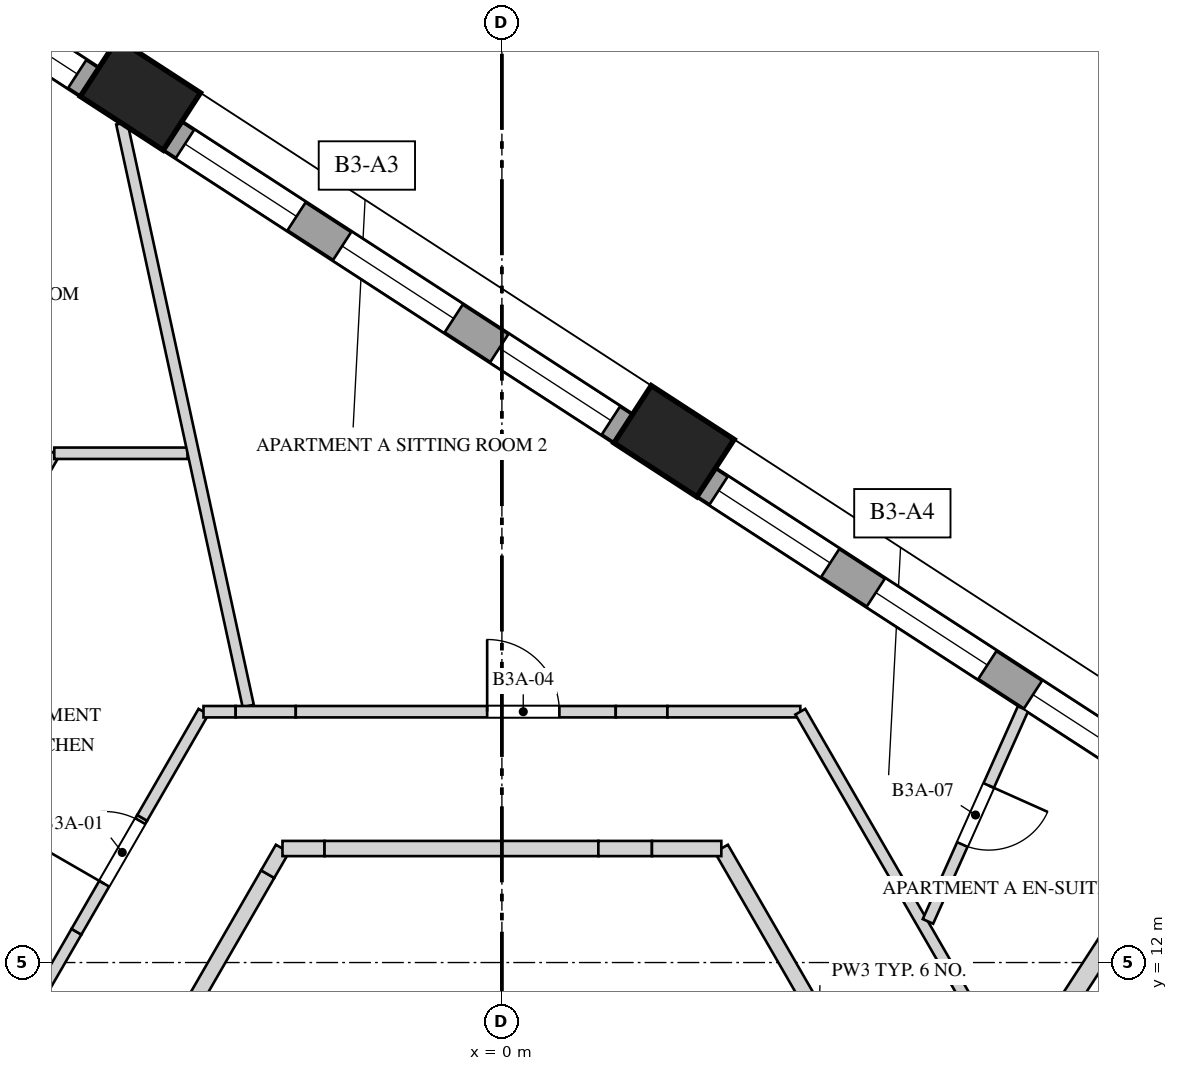
"""IFC4 building model, lengths in metres.
Left out: names, types, materials, properties, quantities, classifications, styles, units other than length and angle.
Written with IfcOpenShell. Run it as: python <this file> out.ifc"""

import sys

from ifc_helpers import new_model, si_unit, direction, frame, frame_2d, origin, origin_2d, place, context, subcontext, project, spatial, polyline, rectangle, outline, extrude, element, fill, save


model = new_model("IFC4")
c1 = context("Model", 3, precision=1e-05, world=origin(), true_north=direction((0.0, 1.0)))
c2 = subcontext(c1, "Body", "Model", "MODEL_VIEW")
j1 = project(units=[si_unit("LENGTHUNIT", "METRE"), si_unit("PLANEANGLEUNIT", "RADIAN")], contexts=[c1])
p1 = place(None, origin())
s1 = spatial("IfcSite", under=j1, at=p1, CompositionType="ELEMENT")
p2 = place(p1, origin())
s2 = spatial("IfcBuilding", under=s1, at=p2, CompositionType="ELEMENT")
p3 = place(p2, frame((0.0, 0.0, 129.6)))
s3 = spatial("IfcBuildingStorey", under=s2, at=p3, CompositionType="ELEMENT", Elevation=129.6)
for number, where, z_axis, x_axis in (
    (1, (2.265, 18.859, 0.0), (0.0, 0.0, 1.0), (-0.839, 0.545, 0.0)),
    (2, (-4.756, 23.418, 0.0), (0.0, 0.0, 1.0), (-0.839, 0.545, 0.0)),
):
    element("IfcColumn", number, at=place(p3, frame(where, z_axis=z_axis, x_axis=x_axis)), inside=s3, PredefinedType="COLUMN", context=c2, shape_type="SweptSolid", body=[
        extrude(rectangle(XDim=1.3, YDim=0.9, at=origin_2d()), origin(), (0.0, 0.0, 1.0), 4.0),
    ])
p4 = place(p3, frame((8.618, 14.465, 0.0), z_axis=(0.0, 0.0, 1.0), x_axis=(-0.838661251934, 0.544653380146, 0.0)))
e3 = element("IfcWall", 3, at=p4, inside=s3, PredefinedType="SOLIDWALL", context=c2, shape_type="SweptSolid", body=[
    extrude(rectangle(XDim=7.072, YDim=0.45, at=frame_2d((3.536, 0.0))), origin(), (0.0, 0.0, 1.0), 3.3),
])
p5 = place(p4, frame((0.195, 0.0, 0.5)))
e4 = element("IfcOpeningElement", 4, at=p5, cuts=e3, PredefinedType="OPENING", context=c2, shape_type="SweptSolid", body=[
    extrude(rectangle(XDim=1.75, YDim=2.65, at=frame_2d((0.875, 1.325))), frame((0.0, 0.235, 0.0), z_axis=(0.0, -1.0, 0.0), x_axis=(1.0, 0.0, 0.0)), (0.0, 0.0, 1.0), 0.47),
])
p6 = place(p4, frame((2.661, 0.0, 0.5)))
e5 = element("IfcOpeningElement", 5, at=p6, cuts=e3, PredefinedType="OPENING", context=c2, shape_type="SweptSolid", body=[
    extrude(rectangle(XDim=1.75, YDim=2.65, at=frame_2d((0.875, 1.325))), frame((0.0, 0.235, 0.0), z_axis=(0.0, -1.0, 0.0), x_axis=(1.0, 0.0, 0.0)), (0.0, 0.0, 1.0), 0.47),
])
p7 = place(p4, frame((5.126, 0.0, 0.5)))
e6 = element("IfcOpeningElement", 6, at=p7, cuts=e3, PredefinedType="OPENING", context=c2, shape_type="SweptSolid", body=[
    extrude(rectangle(XDim=1.75, YDim=2.65, at=frame_2d((0.875, 1.325))), frame((0.0, 0.235, 0.0), z_axis=(0.0, -1.0, 0.0), x_axis=(1.0, 0.0, 0.0)), (0.0, 0.0, 1.0), 0.47),
])
p8 = place(p3, frame((1.597, 19.024, 0.0), z_axis=(0.0, 0.0, 1.0), x_axis=(-0.838677021821, 0.54462909679, 0.0)))
e7 = element("IfcWall", 7, at=p8, inside=s3, PredefinedType="SOLIDWALL", context=c2, shape_type="SweptSolid", body=[
    extrude(rectangle(XDim=7.072, YDim=0.45, at=frame_2d((3.536, 0.0))), origin(), (0.0, 0.0, 1.0), 3.3),
])
p9 = place(p8, frame((0.195, 0.0, 0.5)))
e8 = element("IfcOpeningElement", 8, at=p9, cuts=e7, PredefinedType="OPENING", context=c2, shape_type="SweptSolid", body=[
    extrude(rectangle(XDim=1.75, YDim=2.65, at=frame_2d((0.875, 1.325))), frame((0.0, 0.235, 0.0), z_axis=(0.0, -1.0, 0.0), x_axis=(1.0, 0.0, 0.0)), (0.0, 0.0, 1.0), 0.47),
])
p10 = place(p8, frame((2.661, 0.0, 0.5)))
e9 = element("IfcOpeningElement", 9, at=p10, cuts=e7, PredefinedType="OPENING", context=c2, shape_type="SweptSolid", body=[
    extrude(rectangle(XDim=1.75, YDim=2.65, at=frame_2d((0.875, 1.325))), frame((0.0, 0.235, 0.0), z_axis=(0.0, -1.0, 0.0), x_axis=(1.0, 0.0, 0.0)), (0.0, 0.0, 1.0), 0.47),
])
p11 = place(p8, frame((5.126, 0.0, 0.5)))
e10 = element("IfcOpeningElement", 10, at=p11, cuts=e7, PredefinedType="OPENING", context=c2, shape_type="SweptSolid", body=[
    extrude(rectangle(XDim=1.75, YDim=2.0, at=frame_2d((0.875, 1.0))), frame((0.0, 0.235, 0.0), z_axis=(0.0, -1.0, 0.0), x_axis=(1.0, 0.0, 0.0)), (0.0, 0.0, 1.0), 0.47),
])
p12 = place(p3, frame((-5.424, 23.584, 0.0), z_axis=(0.0, 0.0, 1.0), x_axis=(-0.838675466927, 0.544631491171, 0.0)))
e11 = element("IfcWall", 11, at=p12, inside=s3, PredefinedType="SOLIDWALL", context=c2, shape_type="SweptSolid", body=[
    extrude(rectangle(XDim=6.421, YDim=0.45, at=frame_2d((3.211, 0.0))), origin(), (0.0, 0.0, 1.0), 3.3),
])
p13 = place(p12, frame((0.195, 0.0, 0.5)))
e12 = element("IfcOpeningElement", 12, at=p13, cuts=e11, PredefinedType="OPENING", context=c2, shape_type="SweptSolid", body=[
    extrude(rectangle(XDim=1.75, YDim=2.65, at=frame_2d((0.875, 1.325))), frame((0.0, 0.235, 0.0), z_axis=(0.0, -1.0, 0.0), x_axis=(1.0, 0.0, 0.0)), (0.0, 0.0, 1.0), 0.47),
])
p14 = place(p12, frame((2.661, 0.0, 0.5)))
e13 = element("IfcOpeningElement", 13, at=p14, cuts=e11, PredefinedType="OPENING", context=c2, shape_type="SweptSolid", body=[
    extrude(rectangle(XDim=1.75, YDim=2.65, at=frame_2d((0.875, 1.325))), frame((0.0, 0.235, 0.0), z_axis=(0.0, -1.0, 0.0), x_axis=(1.0, 0.0, 0.0)), (0.0, 0.0, 1.0), 0.47),
])
p15 = place(p12, frame((5.126, 0.0, 0.5)))
e14 = element("IfcOpeningElement", 14, at=p15, cuts=e11, PredefinedType="OPENING", context=c2, shape_type="SweptSolid", body=[
    extrude(rectangle(XDim=1.1, YDim=2.0, at=frame_2d((0.55, 1.0))), frame((0.0, 0.235, 0.0), z_axis=(0.0, -1.0, 0.0), x_axis=(1.0, 0.0, 0.0)), (0.0, 0.0, 1.0), 0.47),
])
p16 = place(p3, frame((-6.683, 17.325, 0.0), z_axis=(0.0, 0.0, 1.0), x_axis=(0.500108487576, 0.865962759392, 0.0)))
e15 = element("IfcWall", 15, at=p16, inside=s3, PredefinedType="PARTITIONING", context=c2, shape_type="SweptSolid", body=[
    extrude(rectangle(XDim=1.588, YDim=0.15, at=frame_2d((0.794, 0.0))), origin(), (0.0, 0.0, 1.0), 3.65),
])
p17 = place(p3, frame((-6.064, 11.597, 0.0), z_axis=(0.0, 0.0, 1.0), x_axis=(0.499797962495, 0.866142018774, 0.0)))
e16 = element("IfcWall", 16, at=p17, inside=s3, PredefinedType="PARTITIONING", context=c2, shape_type="SweptSolid", body=[
    extrude(rectangle(XDim=0.933, YDim=0.15, at=frame_2d((0.467, 0.0))), origin(), (0.0, 0.0, 1.0), 3.65),
])
p18 = place(p3, frame((-5.597, 12.405, 0.0), z_axis=(0.0, 0.0, 1.0), x_axis=(0.500040090343, 0.866002256377, 0.0)))
e17 = element("IfcWall", 17, at=p18, inside=s3, PredefinedType="PARTITIONING", context=c2, shape_type="SweptSolid", body=[
    extrude(outline(polyline([(0.0, 0.0), (1.73, 0.0), (1.73, 3.65), (1.104, 3.65), (1.104, 2.55), (0.0, 2.55), (0.0, 0.0)])), frame((0.0, 0.075, 0.0), z_axis=(0.0, -1.0, 0.0), x_axis=(1.0, 0.0, 0.0)), (0.0, 0.0, 1.0), 0.15),
])
p19 = place(p18, frame((0.73, 0.0, 0.0)))
e18 = element("IfcOpeningElement", 18, at=p19, cuts=e17, PredefinedType="OPENING", context=c2, shape_type="SweptSolid", body=[
    extrude(rectangle(XDim=0.95, YDim=2.4, at=frame_2d((0.475, 1.2))), frame((0.0, 0.085, 0.0), z_axis=(0.0, -1.0, 0.0), x_axis=(1.0, 0.0, 0.0)), (0.0, 0.0, 1.0), 0.17),
])
p20 = place(p3, frame((-4.732, 13.903, 0.0), z_axis=(0.0, 0.0, 1.0), x_axis=(0.499997628298, 0.866026773083, 0.0)))
e19 = element("IfcWall", 19, at=p20, inside=s3, PredefinedType="PARTITIONING", context=c2, shape_type="SweptSolid", body=[
    extrude(rectangle(XDim=1.613, YDim=0.15, at=frame_2d((0.806, 0.0))), origin(), (0.0, 0.0, 1.0), 3.65),
])
p21 = place(p3, frame((-5.889, 18.7, 0.0), z_axis=(0.0, 0.0, 1.0), x_axis=(1.0, 0.0, 0.0)))
e20 = element("IfcWall", 20, at=p21, inside=s3, PredefinedType="PARTITIONING", context=c2, shape_type="SweptSolid", body=[
    extrude(rectangle(XDim=1.753, YDim=0.15, at=frame_2d((0.877, 0.0))), origin(), (0.0, 0.0, 1.0), 3.65),
])
p22 = place(p3, frame((-5.001, 23.041, 0.0), z_axis=(0.0, 0.0, 1.0), x_axis=(0.212100148987, -0.977247935173, 0.0)))
e21 = element("IfcWall", 21, at=p22, inside=s3, PredefinedType="PARTITIONING", context=c2, shape_type="SweptSolid", body=[
    extrude(rectangle(XDim=7.844, YDim=0.15, at=frame_2d((3.922, 0.0))), origin(), (0.0, 0.0, 1.0), 2.75),
])
p23 = place(p3, frame((-3.926, 15.3, 0.0), z_axis=(0.0, 0.0, 1.0), x_axis=(1.0, 0.0, 0.0)))
e22 = element("IfcWall", 22, at=p23, inside=s3, PredefinedType="PARTITIONING", context=c2, shape_type="SweptSolid", body=[
    extrude(rectangle(XDim=0.423, YDim=0.15, at=frame_2d((0.212, 0.0))), origin(), (0.0, 0.0, 1.0), 3.65),
])
p24 = place(p3, frame((-3.503, 15.3, 0.0), z_axis=(0.0, 0.0, 1.0), x_axis=(1.0, 0.0, 0.0)))
e23 = element("IfcWall", 23, at=p24, inside=s3, PredefinedType="PARTITIONING", context=c2, shape_type="SweptSolid", body=[
    extrude(rectangle(XDim=0.791, YDim=0.15, at=frame_2d((0.396, 0.0))), origin(), (0.0, 0.0, 1.0), 2.75),
])
p25 = place(p3, frame((-2.712, 15.3, 0.0), z_axis=(0.0, 0.0, 1.0), x_axis=(1.0, 0.0, 0.0)))
e24 = element("IfcWall", 24, at=p25, inside=s3, PredefinedType="PARTITIONING", context=c2, shape_type="SweptSolid", body=[
    extrude(rectangle(XDim=4.209, YDim=0.15, at=frame_2d((2.105, 0.0))), origin(), (0.0, 0.0, 1.0), 3.65),
])
p26 = place(p25, frame((2.518, 0.0, 0.0)))
e25 = element("IfcOpeningElement", 25, at=p26, cuts=e24, PredefinedType="OPENING", context=c2, shape_type="SweptSolid", body=[
    extrude(rectangle(XDim=0.95, YDim=2.4, at=frame_2d((0.475, 1.2))), frame((0.0, 0.085, 0.0), z_axis=(0.0, -1.0, 0.0), x_axis=(1.0, 0.0, 0.0)), (0.0, 0.0, 1.0), 0.17),
])
p27 = place(p3, frame((1.498, 15.3, 0.0), z_axis=(0.0, 0.0, 1.0), x_axis=(1.0, 0.0, 0.0)))
e26 = element("IfcWall", 26, at=p27, inside=s3, PredefinedType="PARTITIONING", context=c2, shape_type="SweptSolid", body=[
    extrude(rectangle(XDim=0.68, YDim=0.15, at=frame_2d((0.34, 0.0))), origin(), (0.0, 0.0, 1.0), 2.95),
])
p28 = place(p3, frame((2.177, 15.3, 0.0), z_axis=(0.0, 0.0, 1.0), x_axis=(1.0, 0.0, 0.0)))
e27 = element("IfcWall", 27, at=p28, inside=s3, PredefinedType="PARTITIONING", context=c2, shape_type="SweptSolid", body=[
    extrude(rectangle(XDim=1.749, YDim=0.15, at=frame_2d((0.874, 0.0))), origin(), (0.0, 0.0, 1.0), 3.65),
])
p29 = place(p3, frame((3.926, 15.3, 0.0), z_axis=(0.0, 0.0, 1.0), x_axis=(0.499974706519, -0.86604000649, 0.0)))
e28 = element("IfcWall", 28, at=p29, inside=s3, PredefinedType="PARTITIONING", context=c2, shape_type="SweptSolid", body=[
    extrude(rectangle(XDim=5.278, YDim=0.15, at=frame_2d((2.639, 0.0))), origin(), (0.0, 0.0, 1.0), 3.65),
])
p30 = place(p3, frame((6.856, 15.341, 0.0), z_axis=(0.0, 0.0, 1.0), x_axis=(-0.408065741822, -0.912952545509, 0.0)))
e29 = element("IfcWall", 29, at=p30, inside=s3, PredefinedType="PARTITIONING", context=c2, shape_type="SweptSolid", body=[
    extrude(rectangle(XDim=3.066, YDim=0.15, at=frame_2d((1.533, 0.0))), origin(), (0.0, 0.0, 1.0), 3.65),
])
p31 = place(p30, frame((1.108, 0.0, 0.0)))
e30 = element("IfcOpeningElement", 30, at=p31, cuts=e29, PredefinedType="OPENING", context=c2, shape_type="SweptSolid", body=[
    extrude(rectangle(XDim=0.85, YDim=2.4, at=frame_2d((0.425, 1.2))), frame((0.0, 0.085, 0.0), z_axis=(0.0, -1.0, 0.0), x_axis=(1.0, 0.0, 0.0)), (0.0, 0.0, 1.0), 0.17),
])
p32 = place(p3, frame((9.041, 13.922, 0.0), z_axis=(0.0, 0.0, 1.0), x_axis=(-0.544639775338, -0.838670087174, 0.0)))
e31 = element("IfcWall", 31, at=p32, inside=s3, PredefinedType="SOLIDWALL", context=c2, shape_type="SweptSolid", body=[
    extrude(rectangle(XDim=6.106, YDim=0.25, at=frame_2d((3.053, 0.0))), origin(), (0.0, 0.0, 1.0), 2.95),
])
p33 = place(p3, frame((2.887, 13.5, 0.0), z_axis=(0.0, 0.0, 1.0), x_axis=(0.50000466804, -0.866022708674, 0.0)))
e32 = element("IfcWall", 32, at=p33, inside=s3, PredefinedType="SOLIDWALL", context=c2, shape_type="SweptSolid", body=[
    extrude(rectangle(XDim=5.142, YDim=0.2, at=frame_2d((2.571, 0.0))), origin(), (0.0, 0.0, 1.0), 3.65),
])
p34 = place(p3, frame((-4.171, 11.276, 0.0), z_axis=(0.0, 0.0, 1.0), x_axis=(0.50001992892, 0.866013897511, 0.0)))
e33 = element("IfcWall", 33, at=p34, inside=s3, PredefinedType="SOLIDWALL", context=c2, shape_type="SweptSolid", body=[
    extrude(rectangle(XDim=2.179, YDim=0.2, at=frame_2d((1.089, 0.0))), origin(), (0.0, 0.0, 1.0), 3.65),
])
p35 = place(p3, frame((-3.081, 13.163, 0.0), z_axis=(0.0, 0.0, 1.0), x_axis=(0.499849133735, 0.866112488944, 0.0)))
e34 = element("IfcWall", 34, at=p35, inside=s3, PredefinedType="SOLIDWALL", context=c2, shape_type="SweptSolid", body=[
    extrude(rectangle(XDim=0.389, YDim=0.2, at=frame_2d((0.195, 0.0))), origin(), (0.0, 0.0, 1.0), 2.75),
])
p36 = place(p3, frame((-2.887, 13.5, 0.0), z_axis=(0.0, 0.0, 1.0), x_axis=(1.0, 0.0, 0.0)))
e35 = element("IfcWall", 35, at=p36, inside=s3, PredefinedType="SOLIDWALL", context=c2, shape_type="SweptSolid", body=[
    extrude(rectangle(XDim=0.553, YDim=0.2, at=frame_2d((0.277, 0.0))), origin(), (0.0, 0.0, 1.0), 2.75),
])
p37 = place(p3, frame((-2.333, 13.5, 0.0), z_axis=(0.0, 0.0, 1.0), x_axis=(1.0, 0.0, 0.0)))
e36 = element("IfcWall", 36, at=p37, inside=s3, PredefinedType="SOLIDWALL", context=c2, shape_type="SweptSolid", body=[
    extrude(rectangle(XDim=3.603, YDim=0.2, at=frame_2d((1.801, 0.0))), origin(), (0.0, 0.0, 1.0), 3.65),
])
p38 = place(p3, frame((1.269, 13.5, 0.0), z_axis=(0.0, 0.0, 1.0), x_axis=(1.0, 0.0, 0.0)))
e37 = element("IfcWall", 37, at=p38, inside=s3, PredefinedType="SOLIDWALL", context=c2, shape_type="SweptSolid", body=[
    extrude(rectangle(XDim=0.705, YDim=0.2, at=frame_2d((0.353, 0.0))), origin(), (0.0, 0.0, 1.0), 2.95),
])
p39 = place(p3, frame((1.974, 13.5, 0.0), z_axis=(0.0, 0.0, 1.0), x_axis=(1.0, 0.0, 0.0)))
e38 = element("IfcWall", 38, at=p39, inside=s3, PredefinedType="SOLIDWALL", context=c2, shape_type="SweptSolid", body=[
    extrude(rectangle(XDim=0.913, YDim=0.2, at=frame_2d((0.457, 0.0))), origin(), (0.0, 0.0, 1.0), 3.65),
])
p40 = place(p5, origin())
e39 = element("IfcWindow", 39, at=p40, inside=s3, PartitioningType="SINGLE_PANEL", PredefinedType="WINDOW", context=c2, shape_type="SweptSolid", body=[
    extrude(rectangle(XDim=1.75, YDim=2.65, at=frame_2d((0.875, 1.325))), frame((0.0, 0.03, 0.0), z_axis=(0.0, -1.0, 0.0), x_axis=(1.0, 0.0, 0.0)), (0.0, 0.0, 1.0), 0.06),
])
fill(e4, e39)
p41 = place(p6, origin())
e40 = element("IfcWindow", 40, at=p41, inside=s3, PartitioningType="SINGLE_PANEL", PredefinedType="WINDOW", context=c2, shape_type="SweptSolid", body=[
    extrude(rectangle(XDim=1.75, YDim=2.65, at=frame_2d((0.875, 1.325))), frame((0.0, 0.03, 0.0), z_axis=(0.0, -1.0, 0.0), x_axis=(1.0, 0.0, 0.0)), (0.0, 0.0, 1.0), 0.06),
])
fill(e5, e40)
p42 = place(p7, origin())
e41 = element("IfcWindow", 41, at=p42, inside=s3, PartitioningType="SINGLE_PANEL", PredefinedType="WINDOW", context=c2, shape_type="SweptSolid", body=[
    extrude(rectangle(XDim=1.75, YDim=2.65, at=frame_2d((0.875, 1.325))), frame((0.0, 0.03, 0.0), z_axis=(0.0, -1.0, 0.0), x_axis=(1.0, 0.0, 0.0)), (0.0, 0.0, 1.0), 0.06),
])
fill(e6, e41)
p43 = place(p9, origin())
e42 = element("IfcWindow", 42, at=p43, inside=s3, PartitioningType="SINGLE_PANEL", PredefinedType="WINDOW", context=c2, shape_type="SweptSolid", body=[
    extrude(rectangle(XDim=1.75, YDim=2.65, at=frame_2d((0.875, 1.325))), frame((0.0, 0.03, 0.0), z_axis=(0.0, -1.0, 0.0), x_axis=(1.0, 0.0, 0.0)), (0.0, 0.0, 1.0), 0.06),
])
fill(e8, e42)
p44 = place(p10, origin())
e43 = element("IfcWindow", 43, at=p44, inside=s3, PartitioningType="SINGLE_PANEL", PredefinedType="WINDOW", context=c2, shape_type="SweptSolid", body=[
    extrude(rectangle(XDim=1.75, YDim=2.65, at=frame_2d((0.875, 1.325))), frame((0.0, 0.03, 0.0), z_axis=(0.0, -1.0, 0.0), x_axis=(1.0, 0.0, 0.0)), (0.0, 0.0, 1.0), 0.06),
])
fill(e9, e43)
p45 = place(p11, origin())
e44 = element("IfcWindow", 44, at=p45, inside=s3, PartitioningType="SINGLE_PANEL", PredefinedType="WINDOW", context=c2, shape_type="SweptSolid", body=[
    extrude(rectangle(XDim=1.75, YDim=2.0, at=frame_2d((0.875, 1.0))), frame((0.0, 0.03, 0.0), z_axis=(0.0, -1.0, 0.0), x_axis=(1.0, 0.0, 0.0)), (0.0, 0.0, 1.0), 0.06),
])
fill(e10, e44)
p46 = place(p13, origin())
e45 = element("IfcWindow", 45, at=p46, inside=s3, PartitioningType="SINGLE_PANEL", PredefinedType="WINDOW", context=c2, shape_type="SweptSolid", body=[
    extrude(rectangle(XDim=1.75, YDim=2.65, at=frame_2d((0.875, 1.325))), frame((0.0, 0.03, 0.0), z_axis=(0.0, -1.0, 0.0), x_axis=(1.0, 0.0, 0.0)), (0.0, 0.0, 1.0), 0.06),
])
fill(e12, e45)
p47 = place(p19, origin())
e46 = element("IfcDoor", 46, at=p47, inside=s3, OperationType="SINGLE_SWING_LEFT", PredefinedType="DOOR", context=c2, shape_type="SweptSolid", body=[
    extrude(rectangle(XDim=0.95, YDim=2.4, at=frame_2d((0.475, 1.2))), frame((0.0, 0.025, 0.0), z_axis=(0.0, -1.0, 0.0), x_axis=(1.0, 0.0, 0.0)), (0.0, 0.0, 1.0), 0.05),
])
fill(e18, e46)
p48 = place(p26, origin())
e47 = element("IfcDoor", 47, at=p48, inside=s3, OperationType="SINGLE_SWING_RIGHT", PredefinedType="DOOR", context=c2, shape_type="SweptSolid", body=[
    extrude(rectangle(XDim=0.95, YDim=2.4, at=frame_2d((0.475, 1.2))), frame((0.0, 0.025, 0.0), z_axis=(0.0, -1.0, 0.0), x_axis=(1.0, 0.0, 0.0)), (0.0, 0.0, 1.0), 0.05),
])
fill(e25, e47)
p49 = place(p31, origin())
e48 = element("IfcDoor", 48, at=p49, inside=s3, OperationType="SINGLE_SWING_LEFT", PredefinedType="DOOR", context=c2, shape_type="SweptSolid", body=[
    extrude(rectangle(XDim=0.85, YDim=2.4, at=frame_2d((0.425, 1.2))), frame((0.0, 0.025, 0.0), z_axis=(0.0, -1.0, 0.0), x_axis=(1.0, 0.0, 0.0)), (0.0, 0.0, 1.0), 0.05),
])
fill(e30, e48)
save(model, sys.argv[1])
